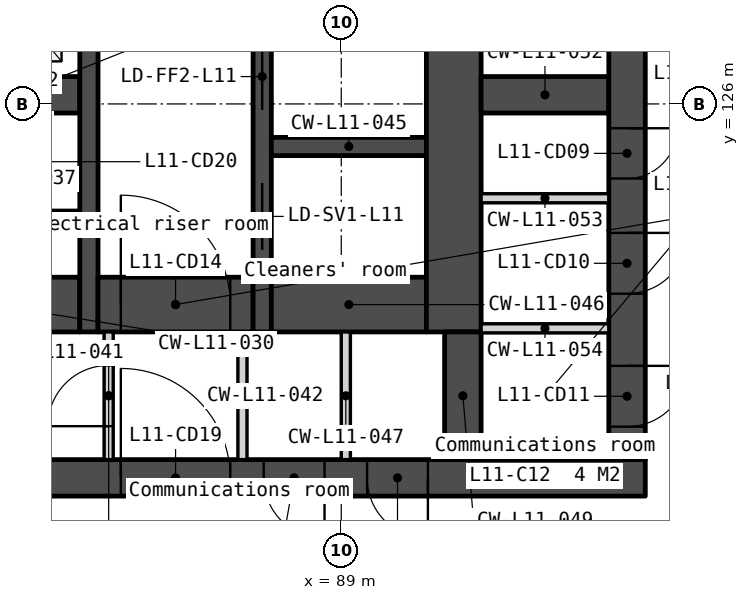
"""IFC4 building model, lengths in metres.
Left out: names, types, materials, properties, quantities, classifications, styles, units other than length and angle.
Written with IfcOpenShell. Run it as: python <this file> out.ifc"""

import sys

from ifc_helpers import new_model, si_unit, direction, frame, frame_2d, origin, place, context, subcontext, project, spatial, polyline, rectangle, outline, extrude, element, fill, save


model = new_model("IFC4")
c1 = context("Model", 3, precision=1e-05, world=origin(), true_north=direction((0.0, 1.0)))
c2 = subcontext(c1, "Body", "Model", "MODEL_VIEW")
j1 = project(units=[si_unit("LENGTHUNIT", "METRE"), si_unit("PLANEANGLEUNIT", "RADIAN")], contexts=[c1])
p1 = place(None, origin())
s1 = spatial("IfcSite", under=j1, at=p1, CompositionType="ELEMENT")
p2 = place(p1, origin())
s2 = spatial("IfcBuilding", under=s1, at=p2, CompositionType="ELEMENT")
p3 = place(p2, frame((0.0, 0.0, 52.5)))
s3 = spatial("IfcBuildingStorey", under=s2, at=p3, CompositionType="ELEMENT", Elevation=52.5)
p4 = place(p3, frame((66.0, 119.85, 0.0), z_axis=(0.0, 0.0, 1.0), x_axis=(1.0, 0.0, 0.0)))
e1 = element("IfcWall", 1, at=p4, inside=s3, PredefinedType="SOLIDWALL", context=c2, shape_type="SweptSolid", body=[
    extrude(rectangle(XDim=28.0, YDim=0.6, at=frame_2d((14.0, 0.0))), origin(), (0.0, 0.0, 1.0), 3.35),
])
p5 = place(p4, frame((6.825, 0.0, 0.0)))
e2 = element("IfcOpeningElement", 2, at=p5, cuts=e1, PredefinedType="OPENING", context=c2, shape_type="SweptSolid", body=[
    extrude(rectangle(XDim=1.8, YDim=2.1, at=frame_2d((0.9, 1.05))), frame((0.0, 0.31, 0.0), z_axis=(0.0, -1.0, 0.0), x_axis=(1.0, 0.0, 0.0)), (0.0, 0.0, 1.0), 0.62),
])
p6 = place(p4, frame((15.85, 0.0, 0.0)))
e3 = element("IfcOpeningElement", 3, at=p6, cuts=e1, PredefinedType="OPENING", context=c2, shape_type="SweptSolid", body=[
    extrude(rectangle(XDim=1.5, YDim=2.1, at=frame_2d((0.75, 1.05))), frame((0.0, 0.31, 0.0), z_axis=(0.0, -1.0, 0.0), x_axis=(1.0, 0.0, 0.0)), (0.0, 0.0, 1.0), 0.62),
])
p7 = place(p4, frame((19.375, 0.0, 0.0)))
e4 = element("IfcOpeningElement", 4, at=p7, cuts=e1, PredefinedType="OPENING", context=c2, shape_type="SweptSolid", body=[
    extrude(rectangle(XDim=1.8, YDim=2.1, at=frame_2d((0.9, 1.05))), frame((0.0, 0.31, 0.0), z_axis=(0.0, -1.0, 0.0), x_axis=(1.0, 0.0, 0.0)), (0.0, 0.0, 1.0), 0.62),
])
p8 = place(p4, frame((4.425, 0.0, 0.0)))
e5 = element("IfcOpeningElement", 5, at=p8, cuts=e1, PredefinedType="OPENING", context=c2, shape_type="SweptSolid", body=[
    extrude(rectangle(XDim=1.0, YDim=2.1, at=frame_2d((0.5, 1.05))), frame((0.0, 0.31, 0.0), z_axis=(0.0, -1.0, 0.0), x_axis=(1.0, 0.0, 0.0)), (0.0, 0.0, 1.0), 0.62),
])
p9 = place(p4, frame((9.783, 0.0, 0.0)))
e6 = element("IfcOpeningElement", 6, at=p9, cuts=e1, PredefinedType="OPENING", context=c2, shape_type="SweptSolid", body=[
    extrude(rectangle(XDim=1.0, YDim=2.1, at=frame_2d((0.5, 1.05))), frame((0.0, 0.31, 0.0), z_axis=(0.0, -1.0, 0.0), x_axis=(1.0, 0.0, 0.0)), (0.0, 0.0, 1.0), 0.62),
])
p10 = place(p4, frame((11.525, 0.0, 0.0)))
e7 = element("IfcOpeningElement", 7, at=p10, cuts=e1, PredefinedType="OPENING", context=c2, shape_type="SweptSolid", body=[
    extrude(rectangle(XDim=1.0, YDim=2.1, at=frame_2d((0.5, 1.05))), frame((0.0, 0.31, 0.0), z_axis=(0.0, -1.0, 0.0), x_axis=(1.0, 0.0, 0.0)), (0.0, 0.0, 1.0), 0.62),
])
p11 = place(p4, frame((13.658, 0.0, 0.0)))
e8 = element("IfcOpeningElement", 8, at=p11, cuts=e1, PredefinedType="OPENING", context=c2, shape_type="SweptSolid", body=[
    extrude(rectangle(XDim=1.0, YDim=2.1, at=frame_2d((0.5, 1.05))), frame((0.0, 0.31, 0.0), z_axis=(0.0, -1.0, 0.0), x_axis=(1.0, 0.0, 0.0)), (0.0, 0.0, 1.0), 0.62),
])
p12 = place(p4, frame((21.725, 0.0, 0.0)))
e9 = element("IfcOpeningElement", 9, at=p12, cuts=e1, PredefinedType="OPENING", context=c2, shape_type="SweptSolid", body=[
    extrude(rectangle(XDim=1.0, YDim=2.1, at=frame_2d((0.5, 1.05))), frame((0.0, 0.31, 0.0), z_axis=(0.0, -1.0, 0.0), x_axis=(1.0, 0.0, 0.0)), (0.0, 0.0, 1.0), 0.62),
])
p13 = place(p4, frame((23.425, 0.0, 0.0)))
e10 = element("IfcOpeningElement", 10, at=p13, cuts=e1, PredefinedType="OPENING", context=c2, shape_type="SweptSolid", body=[
    extrude(rectangle(XDim=1.0, YDim=2.1, at=frame_2d((0.5, 1.05))), frame((0.0, 0.31, 0.0), z_axis=(0.0, -1.0, 0.0), x_axis=(1.0, 0.0, 0.0)), (0.0, 0.0, 1.0), 0.62),
])
p14 = place(p3, frame((81.8, 122.7, 0.0), z_axis=(0.0, 0.0, 1.0), x_axis=(1.0, 0.0, 0.0)))
e11 = element("IfcWall", 11, at=p14, inside=s3, PredefinedType="SOLIDWALL", context=c2, shape_type="SweptSolid", body=[
    extrude(rectangle(XDim=2.9, YDim=0.9, at=frame_2d((1.45, 0.0))), origin(), (0.0, 0.0, 1.0), 3.35),
])
p15 = place(p14, frame((0.05, 0.0, 0.0)))
e12 = element("IfcOpeningElement", 12, at=p15, cuts=e11, PredefinedType="OPENING", context=c2, shape_type="SweptSolid", body=[
    extrude(rectangle(XDim=1.5, YDim=2.1, at=frame_2d((0.75, 1.05))), frame((0.0, 0.46, 0.0), z_axis=(0.0, -1.0, 0.0), x_axis=(1.0, 0.0, 0.0)), (0.0, 0.0, 1.0), 0.92),
])
p16 = place(p3, frame((82.6, 126.15, 0.0), z_axis=(0.0, 0.0, 1.0), x_axis=(1.0, 0.0, 0.0)))
e13 = element("IfcWall", 13, at=p16, inside=s3, PredefinedType="SOLIDWALL", context=c2, shape_type="SweptSolid", body=[
    extrude(rectangle(XDim=2.1, YDim=0.6, at=frame_2d((1.05, 0.0))), origin(), (0.0, 0.0, 1.0), 3.35),
])
p17 = place(p3, frame((83.35, 124.175, 0.0), z_axis=(0.0, 0.0, 1.0), x_axis=(1.0, 0.0, 0.0)))
e14 = element("IfcWall", 14, at=p17, inside=s3, PredefinedType="PARTITIONING", context=c2, shape_type="SweptSolid", body=[
    extrude(rectangle(XDim=1.35, YDim=0.15, at=frame_2d((0.675, 0.0))), origin(), (0.0, 0.0, 1.0), 3.35),
])
p18 = place(p3, frame((84.85, 133.95, 0.0), z_axis=(0.0, 0.0, 1.0), x_axis=(0.0, -1.0, 0.0)))
e15 = element("IfcWall", 15, at=p18, inside=s3, PredefinedType="SOLIDWALL", context=c2, shape_type="SweptSolid", body=[
    extrude(rectangle(XDim=11.7, YDim=0.3, at=frame_2d((5.85, 0.0))), origin(), (0.0, 0.0, 1.0), 3.35),
])
p19 = place(p3, frame((85.0, 122.7, 0.0), z_axis=(0.0, 0.0, 1.0), x_axis=(1.0, 0.0, 0.0)))
e16 = element("IfcWall", 16, at=p19, inside=s3, PredefinedType="SOLIDWALL", context=c2, shape_type="SweptSolid", body=[
    extrude(rectangle(XDim=2.55, YDim=0.9, at=frame_2d((1.275, 0.0))), origin(), (0.0, 0.0, 1.0), 3.35),
])
p20 = place(p19, frame((0.375, 0.0, 0.0)))
e17 = element("IfcOpeningElement", 17, at=p20, cuts=e16, PredefinedType="OPENING", context=c2, shape_type="SweptSolid", body=[
    extrude(rectangle(XDim=1.8, YDim=2.1, at=frame_2d((0.9, 1.05))), frame((0.0, 0.46, 0.0), z_axis=(0.0, -1.0, 0.0), x_axis=(1.0, 0.0, 0.0)), (0.0, 0.0, 1.0), 0.92),
])
p21 = place(p3, frame((85.175, 122.25, 0.0), z_axis=(0.0, 0.0, 1.0), x_axis=(0.0, -1.0, 0.0)))
e18 = element("IfcWall", 18, at=p21, inside=s3, PredefinedType="PARTITIONING", context=c2, shape_type="SweptSolid", body=[
    extrude(rectangle(XDim=2.1, YDim=0.15, at=frame_2d((1.05, 0.0))), origin(), (0.0, 0.0, 1.0), 3.35),
])
p22 = place(p21, frame((0.55, 0.0, 0.0)))
e19 = element("IfcOpeningElement", 19, at=p22, cuts=e18, PredefinedType="OPENING", context=c2, shape_type="SweptSolid", body=[
    extrude(rectangle(XDim=1.0, YDim=2.1, at=frame_2d((0.5, 1.05))), frame((0.0, 0.085, 0.0), z_axis=(0.0, -1.0, 0.0), x_axis=(1.0, 0.0, 0.0)), (0.0, 0.0, 1.0), 0.17),
])
p23 = place(p3, frame((87.375, 122.25, 0.0), z_axis=(0.0, 0.0, 1.0), x_axis=(0.0, -1.0, 0.0)))
e20 = element("IfcWall", 20, at=p23, inside=s3, PredefinedType="PARTITIONING", context=c2, shape_type="SweptSolid", body=[
    extrude(rectangle(XDim=2.1, YDim=0.15, at=frame_2d((1.05, 0.0))), origin(), (0.0, 0.0, 1.0), 3.35),
])
p24 = place(p3, frame((87.7, 133.95, 0.0), z_axis=(0.0, 0.0, 1.0), x_axis=(0.0, -1.0, 0.0)))
e21 = element("IfcWall", 21, at=p24, inside=s3, PredefinedType="SOLIDWALL", context=c2, shape_type="SweptSolid", body=[
    extrude(rectangle(XDim=11.7, YDim=0.3, at=frame_2d((5.85, 0.0))), origin(), (0.0, 0.0, 1.0), 3.35),
])
p25 = place(p24, frame((6.95, 0.0, 0.0)))
e22 = element("IfcOpeningElement", 22, at=p25, cuts=e21, PredefinedType="OPENING", context=c2, shape_type="SweptSolid", body=[
    extrude(rectangle(XDim=1.1, YDim=2.1, at=frame_2d((0.55, 1.05))), frame((0.0, 0.16, 0.0), z_axis=(0.0, -1.0, 0.0), x_axis=(1.0, 0.0, 0.0)), (0.0, 0.0, 1.0), 0.32),
])
p26 = place(p24, frame((5.1, 0.0, 0.0)))
e23 = element("IfcOpeningElement", 23, at=p26, cuts=e21, PredefinedType="OPENING", context=c2, shape_type="SweptSolid", body=[
    extrude(rectangle(XDim=1.0, YDim=2.1, at=frame_2d((0.5, 1.05))), frame((0.0, 0.16, 0.0), z_axis=(0.0, -1.0, 0.0), x_axis=(1.0, 0.0, 0.0)), (0.0, 0.0, 1.0), 0.32),
])
p27 = place(p24, frame((9.25, 0.0, 0.0)))
e24 = element("IfcOpeningElement", 24, at=p27, cuts=e21, PredefinedType="OPENING", context=c2, shape_type="SweptSolid", body=[
    extrude(rectangle(XDim=1.1, YDim=2.1, at=frame_2d((0.55, 1.05))), frame((0.0, 0.16, 0.0), z_axis=(0.0, -1.0, 0.0), x_axis=(1.0, 0.0, 0.0)), (0.0, 0.0, 1.0), 0.32),
])
p28 = place(p3, frame((87.85, 125.3, 0.0), z_axis=(0.0, 0.0, 1.0), x_axis=(1.0, 0.0, 0.0)))
e25 = element("IfcWall", 25, at=p28, inside=s3, PredefinedType="SOLIDWALL", context=c2, shape_type="SweptSolid", body=[
    extrude(rectangle(XDim=2.55, YDim=0.3, at=frame_2d((1.275, 0.0))), origin(), (0.0, 0.0, 1.0), 3.35),
])
p29 = place(p3, frame((87.85, 122.7, 0.0), z_axis=(0.0, 0.0, 1.0), x_axis=(1.0, 0.0, 0.0)))
e26 = element("IfcWall", 26, at=p29, inside=s3, PredefinedType="SOLIDWALL", context=c2, shape_type="SweptSolid", body=[
    extrude(rectangle(XDim=2.55, YDim=0.9, at=frame_2d((1.275, 0.0))), origin(), (0.0, 0.0, 1.0), 3.35),
])
p30 = place(p3, frame((89.075, 122.25, 0.0), z_axis=(0.0, 0.0, 1.0), x_axis=(0.0, -1.0, 0.0)))
e27 = element("IfcWall", 27, at=p30, inside=s3, PredefinedType="PARTITIONING", context=c2, shape_type="SweptSolid", body=[
    extrude(rectangle(XDim=2.1, YDim=0.15, at=frame_2d((1.05, 0.0))), origin(), (0.0, 0.0, 1.0), 3.35),
])
p31 = place(p3, frame((90.85, 133.95, 0.0), z_axis=(0.0, 0.0, 1.0), x_axis=(0.0, -1.0, 0.0)))
e28 = element("IfcWall", 28, at=p31, inside=s3, PredefinedType="SOLIDWALL", context=c2, shape_type="SweptSolid", body=[
    extrude(rectangle(XDim=11.7, YDim=0.9, at=frame_2d((5.85, 0.0))), origin(), (0.0, 0.0, 1.0), 3.35),
])
p32 = place(p3, frame((91.0, 122.25, 0.0), z_axis=(0.0, 0.0, 1.0), x_axis=(0.0, -1.0, 0.0)))
e29 = element("IfcWall", 29, at=p32, inside=s3, PredefinedType="SOLIDWALL", context=c2, shape_type="SweptSolid", body=[
    extrude(rectangle(XDim=2.1, YDim=0.6, at=frame_2d((1.05, 0.0))), origin(), (0.0, 0.0, 1.0), 3.35),
])
p33 = place(p3, frame((91.3, 126.15, 0.0), z_axis=(0.0, 0.0, 1.0), x_axis=(1.0, 0.0, 0.0)))
e30 = element("IfcWall", 30, at=p33, inside=s3, PredefinedType="SOLIDWALL", context=c2, shape_type="SweptSolid", body=[
    extrude(rectangle(XDim=2.1, YDim=0.6, at=frame_2d((1.05, 0.0))), origin(), (0.0, 0.0, 1.0), 3.35),
])
for number, where, z_axis, x_axis in (
    (31, (91.3, 124.449, 0.0), (0.0, 0.0, 1.0), (1.0, 0.0, 0.0)),
    (32, (91.3, 122.309, 0.0), (0.0, 0.0, 1.0), (1.0, 0.0, 0.0)),
):
    element("IfcWall", number, at=place(p3, frame(where, z_axis=z_axis, x_axis=x_axis)), inside=s3, PredefinedType="PARTITIONING", context=c2, shape_type="SweptSolid", body=[
        extrude(rectangle(XDim=2.1, YDim=0.15, at=frame_2d((1.05, 0.0))), origin(), (0.0, 0.0, 1.0), 3.35),
    ])
p34 = place(p3, frame((93.7, 133.95, 0.0), z_axis=(0.0, 0.0, 1.0), x_axis=(0.0, -1.0, 0.0)))
e33 = element("IfcWall", 33, at=p34, inside=s3, PredefinedType="SOLIDWALL", context=c2, shape_type="SweptSolid", body=[
    extrude(rectangle(XDim=13.8, YDim=0.6, at=frame_2d((6.9, 0.0))), origin(), (0.0, 0.0, 1.0), 3.35),
])
p35 = place(p34, frame((0.6, 0.0, 0.0)))
e34 = element("IfcOpeningElement", 34, at=p35, cuts=e33, PredefinedType="OPENING", context=c2, shape_type="SweptSolid", body=[
    extrude(rectangle(XDim=1.1, YDim=2.1, at=frame_2d((0.55, 1.05))), frame((0.0, 0.31, 0.0), z_axis=(0.0, -1.0, 0.0), x_axis=(1.0, 0.0, 0.0)), (0.0, 0.0, 1.0), 0.62),
])
p36 = place(p34, frame((8.35, 0.0, 0.0)))
e35 = element("IfcOpeningElement", 35, at=p36, cuts=e33, PredefinedType="OPENING", context=c2, shape_type="SweptSolid", body=[
    extrude(rectangle(XDim=0.826, YDim=2.1, at=frame_2d((0.413, 1.05))), frame((0.0, 0.31, 0.0), z_axis=(0.0, -1.0, 0.0), x_axis=(1.0, 0.0, 0.0)), (0.0, 0.0, 1.0), 0.62),
])
p37 = place(p34, frame((10.071, 0.0, 0.0)))
e36 = element("IfcOpeningElement", 36, at=p37, cuts=e33, PredefinedType="OPENING", context=c2, shape_type="SweptSolid", body=[
    extrude(rectangle(XDim=1.0, YDim=2.1, at=frame_2d((0.5, 1.05))), frame((0.0, 0.31, 0.0), z_axis=(0.0, -1.0, 0.0), x_axis=(1.0, 0.0, 0.0)), (0.0, 0.0, 1.0), 0.62),
])
p38 = place(p34, frame((12.258, 0.0, 0.0)))
e37 = element("IfcOpeningElement", 37, at=p38, cuts=e33, PredefinedType="OPENING", context=c2, shape_type="SweptSolid", body=[
    extrude(rectangle(XDim=1.0, YDim=2.1, at=frame_2d((0.5, 1.05))), frame((0.0, 0.31, 0.0), z_axis=(0.0, -1.0, 0.0), x_axis=(1.0, 0.0, 0.0)), (0.0, 0.0, 1.0), 0.62),
])
p39 = place(p3, frame((83.105, 90.599, -0.15), z_axis=(0.0, 0.0, 1.0), x_axis=(0.499999201451, 0.866025864826, 0.0)))
e38 = element("IfcWall", 38, at=p39, inside=s3, PredefinedType="SOLIDWALL", context=c2, shape_type="SweptSolid", body=[
    extrude(outline(polyline([(44.8, 0.0), (44.8, 3.5), (0.0, 3.5), (0.0, 0.0), (44.8, 0.0)])), frame((0.0, 0.225, 0.0), z_axis=(0.0, -1.0, 0.0), x_axis=(1.0, 0.0, 0.0)), (0.0, 0.0, 1.0), 0.45),
])
p40 = place(p39, frame((0.722, 0.0, 1.05)))
e39 = element("IfcOpeningElement", 39, at=p40, cuts=e38, PredefinedType="OPENING", context=c2, shape_type="SweptSolid", body=[
    extrude(rectangle(XDim=1.2, YDim=1.5, at=frame_2d((0.6, 0.75))), frame((0.0, 0.235, 0.0), z_axis=(0.0, -1.0, 0.0), x_axis=(1.0, 0.0, 0.0)), (0.0, 0.0, 1.0), 0.47),
])
p41 = place(p39, frame((7.51, 0.0, 1.05)))
e40 = element("IfcOpeningElement", 40, at=p41, cuts=e38, PredefinedType="OPENING", context=c2, shape_type="SweptSolid", body=[
    extrude(rectangle(XDim=1.2, YDim=1.5, at=frame_2d((0.6, 0.75))), frame((0.0, 0.235, 0.0), z_axis=(0.0, -1.0, 0.0), x_axis=(1.0, 0.0, 0.0)), (0.0, 0.0, 1.0), 0.47),
])
p42 = place(p39, frame((9.21, 0.0, 1.05)))
e41 = element("IfcOpeningElement", 41, at=p42, cuts=e38, PredefinedType="OPENING", context=c2, shape_type="SweptSolid", body=[
    extrude(rectangle(XDim=1.2, YDim=1.5, at=frame_2d((0.6, 0.75))), frame((0.0, 0.235, 0.0), z_axis=(0.0, -1.0, 0.0), x_axis=(1.0, 0.0, 0.0)), (0.0, 0.0, 1.0), 0.47),
])
p43 = place(p39, frame((16.47, 0.0, 1.05)))
e42 = element("IfcOpeningElement", 42, at=p43, cuts=e38, PredefinedType="OPENING", context=c2, shape_type="SweptSolid", body=[
    extrude(rectangle(XDim=1.2, YDim=1.5, at=frame_2d((0.6, 0.75))), frame((0.0, 0.235, 0.0), z_axis=(0.0, -1.0, 0.0), x_axis=(1.0, 0.0, 0.0)), (0.0, 0.0, 1.0), 0.47),
])
p44 = place(p39, frame((18.17, 0.0, 1.05)))
e43 = element("IfcOpeningElement", 43, at=p44, cuts=e38, PredefinedType="OPENING", context=c2, shape_type="SweptSolid", body=[
    extrude(rectangle(XDim=1.2, YDim=1.5, at=frame_2d((0.6, 0.75))), frame((0.0, 0.235, 0.0), z_axis=(0.0, -1.0, 0.0), x_axis=(1.0, 0.0, 0.0)), (0.0, 0.0, 1.0), 0.47),
])
p45 = place(p39, frame((25.43, 0.0, 1.05)))
e44 = element("IfcOpeningElement", 44, at=p45, cuts=e38, PredefinedType="OPENING", context=c2, shape_type="SweptSolid", body=[
    extrude(rectangle(XDim=1.2, YDim=1.5, at=frame_2d((0.6, 0.75))), frame((0.0, 0.235, 0.0), z_axis=(0.0, -1.0, 0.0), x_axis=(1.0, 0.0, 0.0)), (0.0, 0.0, 1.0), 0.47),
])
p46 = place(p39, frame((27.13, 0.0, 1.05)))
e45 = element("IfcOpeningElement", 45, at=p46, cuts=e38, PredefinedType="OPENING", context=c2, shape_type="SweptSolid", body=[
    extrude(rectangle(XDim=1.2, YDim=1.5, at=frame_2d((0.6, 0.75))), frame((0.0, 0.235, 0.0), z_axis=(0.0, -1.0, 0.0), x_axis=(1.0, 0.0, 0.0)), (0.0, 0.0, 1.0), 0.47),
])
p47 = place(p39, frame((34.39, 0.0, 1.05)))
e46 = element("IfcOpeningElement", 46, at=p47, cuts=e38, PredefinedType="OPENING", context=c2, shape_type="SweptSolid", body=[
    extrude(rectangle(XDim=1.2, YDim=1.5, at=frame_2d((0.6, 0.75))), frame((0.0, 0.235, 0.0), z_axis=(0.0, -1.0, 0.0), x_axis=(1.0, 0.0, 0.0)), (0.0, 0.0, 1.0), 0.47),
])
p48 = place(p39, frame((36.09, 0.0, 1.05)))
e47 = element("IfcOpeningElement", 47, at=p48, cuts=e38, PredefinedType="OPENING", context=c2, shape_type="SweptSolid", body=[
    extrude(rectangle(XDim=1.2, YDim=1.5, at=frame_2d((0.6, 0.75))), frame((0.0, 0.235, 0.0), z_axis=(0.0, -1.0, 0.0), x_axis=(1.0, 0.0, 0.0)), (0.0, 0.0, 1.0), 0.47),
])
p49 = place(p39, frame((42.878, 0.0, 1.05)))
e48 = element("IfcOpeningElement", 48, at=p49, cuts=e38, PredefinedType="OPENING", context=c2, shape_type="SweptSolid", body=[
    extrude(rectangle(XDim=1.2, YDim=1.5, at=frame_2d((0.6, 0.75))), frame((0.0, 0.235, 0.0), z_axis=(0.0, -1.0, 0.0), x_axis=(1.0, 0.0, 0.0)), (0.0, 0.0, 1.0), 0.47),
])
p50 = place(p36, origin())
e49 = element("IfcDoor", 49, at=p50, inside=s3, OperationType="SINGLE_SWING_LEFT", PredefinedType="DOOR", context=c2, shape_type="SweptSolid", body=[
    extrude(rectangle(XDim=0.826, YDim=2.1, at=frame_2d((0.413, 1.05))), frame((0.0, 0.025, 0.0), z_axis=(0.0, -1.0, 0.0), x_axis=(1.0, 0.0, 0.0)), (0.0, 0.0, 1.0), 0.05),
])
fill(e35, e49)
p51 = place(p37, origin())
e50 = element("IfcDoor", 50, at=p51, inside=s3, OperationType="SINGLE_SWING_LEFT", PredefinedType="DOOR", context=c2, shape_type="SweptSolid", body=[
    extrude(rectangle(XDim=1.0, YDim=2.1, at=frame_2d((0.5, 1.05))), frame((0.0, 0.025, 0.0), z_axis=(0.0, -1.0, 0.0), x_axis=(1.0, 0.0, 0.0)), (0.0, 0.0, 1.0), 0.05),
])
fill(e36, e50)
p52 = place(p38, origin())
e51 = element("IfcDoor", 51, at=p52, inside=s3, OperationType="SINGLE_SWING_LEFT", PredefinedType="DOOR", context=c2, shape_type="SweptSolid", body=[
    extrude(rectangle(XDim=1.0, YDim=2.1, at=frame_2d((0.5, 1.05))), frame((0.0, 0.025, 0.0), z_axis=(0.0, -1.0, 0.0), x_axis=(1.0, 0.0, 0.0)), (0.0, 0.0, 1.0), 0.05),
])
fill(e37, e51)
p53 = place(p25, origin())
e52 = element("IfcDoor", 52, at=p53, inside=s3, OperationType="SLIDING_TO_LEFT", PredefinedType="DOOR", context=c2, shape_type="SweptSolid", body=[
    extrude(rectangle(XDim=1.1, YDim=2.1, at=frame_2d((0.55, 1.05))), frame((0.0, 0.025, 0.0), z_axis=(0.0, -1.0, 0.0), x_axis=(1.0, 0.0, 0.0)), (0.0, 0.0, 1.0), 0.05),
])
fill(e22, e52)
p54 = place(p20, origin())
e53 = element("IfcDoor", 53, at=p54, inside=s3, OperationType="DOUBLE_DOOR_DOUBLE_SWING", PredefinedType="DOOR", context=c2, shape_type="SweptSolid", body=[
    extrude(rectangle(XDim=1.8, YDim=2.1, at=frame_2d((0.9, 1.05))), frame((0.0, 0.025, 0.0), z_axis=(0.0, -1.0, 0.0), x_axis=(1.0, 0.0, 0.0)), (0.0, 0.0, 1.0), 0.05),
])
fill(e17, e53)
p55 = place(p7, origin())
e54 = element("IfcDoor", 54, at=p55, inside=s3, OperationType="DOUBLE_DOOR_DOUBLE_SWING", PredefinedType="DOOR", context=c2, shape_type="SweptSolid", body=[
    extrude(rectangle(XDim=1.8, YDim=2.1, at=frame_2d((0.9, 1.05))), frame((0.0, 0.025, 0.0), z_axis=(0.0, -1.0, 0.0), x_axis=(1.0, 0.0, 0.0)), (0.0, 0.0, 1.0), 0.05),
])
fill(e4, e54)
p56 = place(p22, origin())
e55 = element("IfcDoor", 55, at=p56, inside=s3, OperationType="SINGLE_SWING_RIGHT", PredefinedType="DOOR", context=c2, shape_type="SweptSolid", body=[
    extrude(rectangle(XDim=1.0, YDim=2.1, at=frame_2d((0.5, 1.05))), frame((0.0, 0.025, 0.0), z_axis=(0.0, -1.0, 0.0), x_axis=(1.0, 0.0, 0.0)), (0.0, 0.0, 1.0), 0.05),
])
fill(e19, e55)
p57 = place(p12, origin())
e56 = element("IfcDoor", 56, at=p57, inside=s3, OperationType="SINGLE_SWING_RIGHT", PredefinedType="DOOR", context=c2, shape_type="SweptSolid", body=[
    extrude(rectangle(XDim=1.0, YDim=2.1, at=frame_2d((0.5, 1.05))), frame((0.0, 0.025, 0.0), z_axis=(0.0, -1.0, 0.0), x_axis=(1.0, 0.0, 0.0)), (0.0, 0.0, 1.0), 0.05),
])
fill(e9, e56)
p58 = place(p13, origin())
e57 = element("IfcDoor", 57, at=p58, inside=s3, OperationType="SINGLE_SWING_RIGHT", PredefinedType="DOOR", context=c2, shape_type="SweptSolid", body=[
    extrude(rectangle(XDim=1.0, YDim=2.1, at=frame_2d((0.5, 1.05))), frame((0.0, 0.025, 0.0), z_axis=(0.0, -1.0, 0.0), x_axis=(1.0, 0.0, 0.0)), (0.0, 0.0, 1.0), 0.05),
])
fill(e10, e57)
p59 = place(p27, origin())
e58 = element("IfcDoor", 58, at=p59, inside=s3, OperationType="SLIDING_TO_LEFT", PredefinedType="DOOR", context=c2, shape_type="SweptSolid", body=[
    extrude(rectangle(XDim=1.1, YDim=2.1, at=frame_2d((0.55, 1.05))), frame((0.0, 0.025, 0.0), z_axis=(0.0, -1.0, 0.0), x_axis=(1.0, 0.0, 0.0)), (0.0, 0.0, 1.0), 0.05),
])
fill(e24, e58)
save(model, sys.argv[1])
